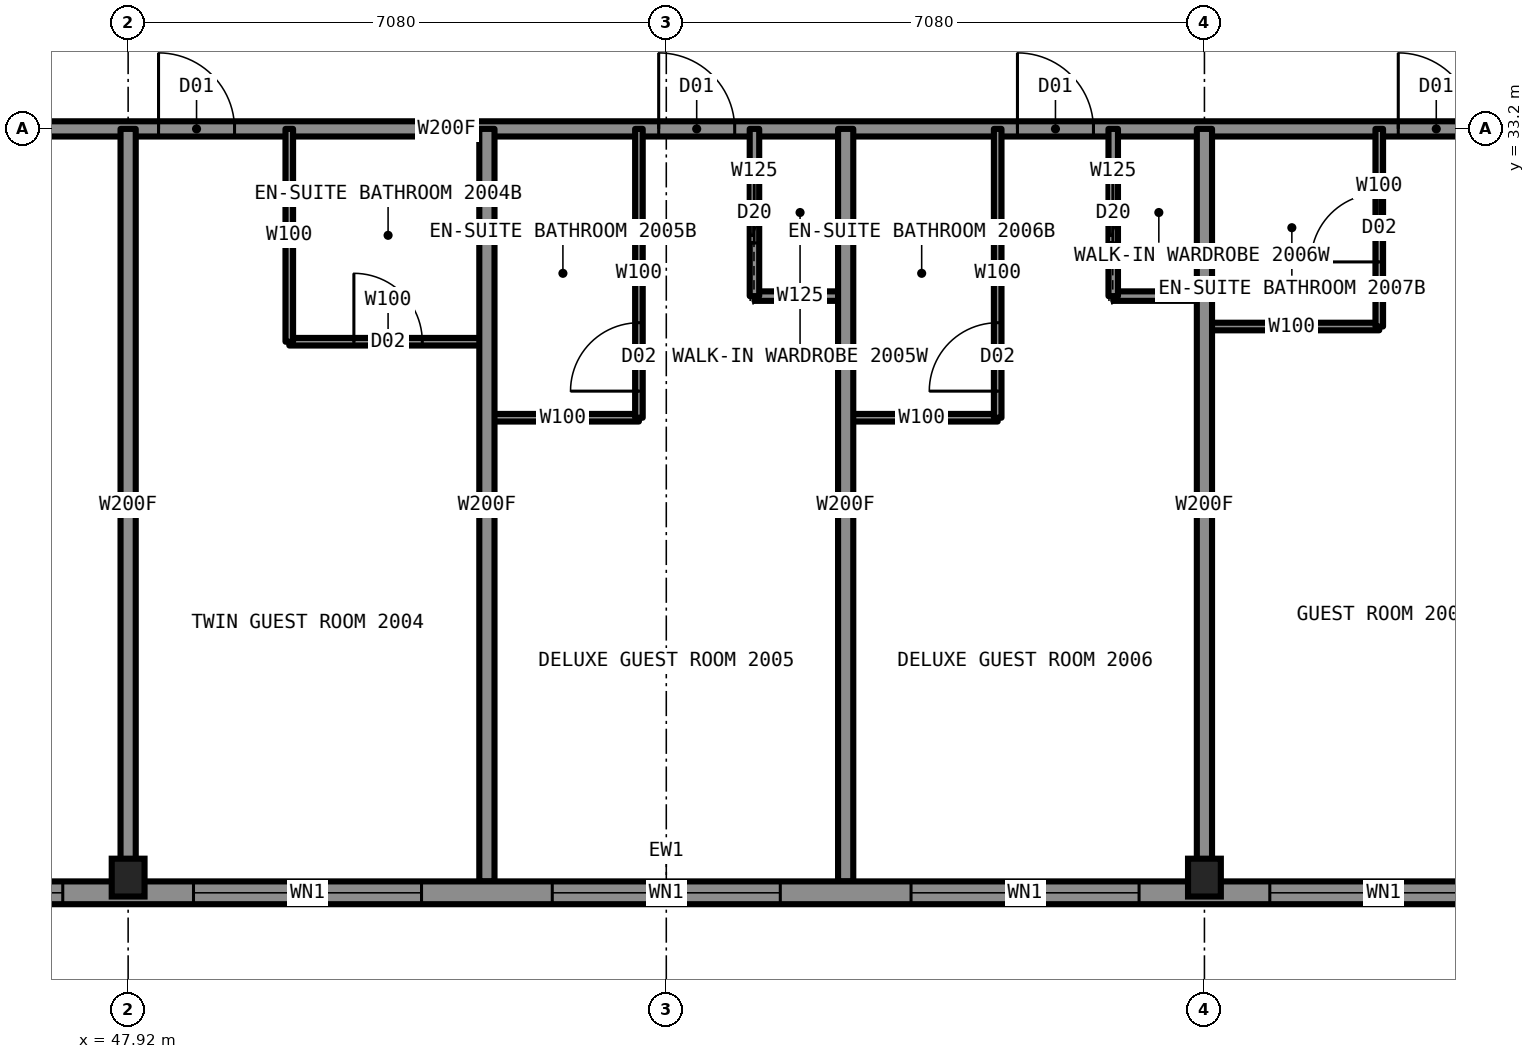
"""IFC4 building model, lengths in metres.
Left out: names, types, materials, properties, quantities, classifications, styles, units other than length and angle.
Written with IfcOpenShell. Run it as: python <this file> out.ifc"""

import sys

from ifc_helpers import new_model, si_unit, direction, frame, frame_2d, origin, origin_2d, place, context, subcontext, project, spatial, rectangle, i_section, extrude, element, fill, save


model = new_model("IFC4")
c1 = context("Model", 3, precision=1e-05, world=origin(), true_north=direction((0.0, 1.0)))
c2 = subcontext(c1, "Body", "Model", "MODEL_VIEW")
j1 = project(units=[si_unit("LENGTHUNIT", "METRE"), si_unit("PLANEANGLEUNIT", "RADIAN")], contexts=[c1])
p1 = place(None, origin())
s1 = spatial("IfcSite", under=j1, at=p1, CompositionType="ELEMENT")
p2 = place(p1, origin())
s2 = spatial("IfcBuilding", under=s1, at=p2, CompositionType="ELEMENT")
p3 = place(p2, frame((0.0, 0.0, 70.5)))
s3 = spatial("IfcBuildingStorey", under=s2, at=p3, CompositionType="ELEMENT", Elevation=70.5)
for number, where, z_axis, x_axis in (
    (1, (47.92, 23.35, 0.0), (0.0, 0.0, 1.0), (1.0, 0.0, 0.0)),
    (2, (62.08, 23.35, 0.0), (0.0, 0.0, 1.0), (1.0, 0.0, 0.0)),
):
    element("IfcColumn", number, at=place(p3, frame(where, z_axis=z_axis, x_axis=x_axis)), inside=s3, PredefinedType="COLUMN", context=c2, shape_type="SweptSolid", body=[
        extrude(i_section(OverallWidth=0.432, OverallDepth=0.498, WebThickness=0.056, FlangeThickness=0.089, at=origin_2d()), origin(), (0.0, 0.0, 1.0), 3.5),
    ])
p4 = place(p3, frame((43.2, 33.2, 0.0), z_axis=(0.0, 0.0, 1.0), x_axis=(1.0, 0.0, 0.0)))
e3 = element("IfcWall", 3, at=p4, inside=s3, PredefinedType="PARTITIONING", context=c2, shape_type="SweptSolid", body=[
    extrude(rectangle(XDim=23.6, YDim=0.2, at=frame_2d((11.8, 0.0))), origin(), (0.0, 0.0, 1.0), 3.33),
])
p5 = place(p4, frame((2.55, 0.0, 0.0)))
e4 = element("IfcOpeningElement", 4, at=p5, cuts=e3, PredefinedType="OPENING", context=c2, shape_type="SweptSolid", body=[
    extrude(rectangle(XDim=1.0, YDim=2.2, at=frame_2d((0.5, 1.1))), frame((0.0, 0.11, 0.0), z_axis=(0.0, -1.0, 0.0), x_axis=(1.0, 0.0, 0.0)), (0.0, 0.0, 1.0), 0.22),
])
p6 = place(p4, frame((5.12, 0.0, 0.0)))
e5 = element("IfcOpeningElement", 5, at=p6, cuts=e3, PredefinedType="OPENING", context=c2, shape_type="SweptSolid", body=[
    extrude(rectangle(XDim=1.0, YDim=2.2, at=frame_2d((0.5, 1.1))), frame((0.0, 0.11, 0.0), z_axis=(0.0, -1.0, 0.0), x_axis=(1.0, 0.0, 0.0)), (0.0, 0.0, 1.0), 0.22),
])
p7 = place(p4, frame((11.7, 0.0, 0.0)))
e6 = element("IfcOpeningElement", 6, at=p7, cuts=e3, PredefinedType="OPENING", context=c2, shape_type="SweptSolid", body=[
    extrude(rectangle(XDim=1.0, YDim=2.2, at=frame_2d((0.5, 1.1))), frame((0.0, 0.11, 0.0), z_axis=(0.0, -1.0, 0.0), x_axis=(1.0, 0.0, 0.0)), (0.0, 0.0, 1.0), 0.22),
])
p8 = place(p4, frame((16.42, 0.0, 0.0)))
e7 = element("IfcOpeningElement", 7, at=p8, cuts=e3, PredefinedType="OPENING", context=c2, shape_type="SweptSolid", body=[
    extrude(rectangle(XDim=1.0, YDim=2.2, at=frame_2d((0.5, 1.1))), frame((0.0, 0.11, 0.0), z_axis=(0.0, -1.0, 0.0), x_axis=(1.0, 0.0, 0.0)), (0.0, 0.0, 1.0), 0.22),
])
p9 = place(p4, frame((21.43, 0.0, 0.0)))
e8 = element("IfcOpeningElement", 8, at=p9, cuts=e3, PredefinedType="OPENING", context=c2, shape_type="SweptSolid", body=[
    extrude(rectangle(XDim=1.0, YDim=2.2, at=frame_2d((0.5, 1.1))), frame((0.0, 0.11, 0.0), z_axis=(0.0, -1.0, 0.0), x_axis=(1.0, 0.0, 0.0)), (0.0, 0.0, 1.0), 0.22),
])
for number, where, z_axis, x_axis in (
    (9, (56.16, 31.0, 0.0), (0.0, 0.0, 1.0), (1.0, 0.0, 0.0)),
    (10, (60.88, 31.0, 0.0), (0.0, 0.0, 1.0), (1.0, 0.0, 0.0)),
):
    element("IfcWall", number, at=place(p3, frame(where, z_axis=z_axis, x_axis=x_axis)), inside=s3, PredefinedType="PARTITIONING", context=c2, shape_type="SweptSolid", body=[
        extrude(rectangle(XDim=1.2, YDim=0.125, at=frame_2d((0.6, 0.0))), origin(), (0.0, 0.0, 1.0), 3.33),
    ])
p10 = place(p3, frame((62.08, 30.6, 0.0), z_axis=(0.0, 0.0, 1.0), x_axis=(1.0, 0.0, 0.0)))
e11 = element("IfcWall", 11, at=p10, inside=s3, PredefinedType="PARTITIONING", context=c2, shape_type="SweptSolid", body=[
    extrude(rectangle(XDim=2.3, YDim=0.1, at=frame_2d((1.15, 0.0))), origin(), (0.0, 0.0, 1.0), 3.33),
])
p11 = place(p3, frame((50.04, 30.4, 0.0), z_axis=(0.0, 0.0, 1.0), x_axis=(1.0, 0.0, 0.0)))
e12 = element("IfcWall", 12, at=p11, inside=s3, PredefinedType="PARTITIONING", context=c2, shape_type="SweptSolid", body=[
    extrude(rectangle(XDim=2.6, YDim=0.1, at=frame_2d((1.3, 0.0))), origin(), (0.0, 0.0, 1.0), 3.33),
])
p12 = place(p11, frame((0.85, 0.0, 0.0)))
e13 = element("IfcOpeningElement", 13, at=p12, cuts=e12, PredefinedType="OPENING", context=c2, shape_type="SweptSolid", body=[
    extrude(rectangle(XDim=0.9, YDim=2.1, at=frame_2d((0.45, 1.05))), frame((0.0, 0.06, 0.0), z_axis=(0.0, -1.0, 0.0), x_axis=(1.0, 0.0, 0.0)), (0.0, 0.0, 1.0), 0.12),
])
for number, where, z_axis, x_axis in (
    (14, (52.64, 29.4, 0.0), (0.0, 0.0, 1.0), (1.0, 0.0, 0.0)),
    (15, (57.36, 29.4, 0.0), (0.0, 0.0, 1.0), (1.0, 0.0, 0.0)),
):
    element("IfcWall", number, at=place(p3, frame(where, z_axis=z_axis, x_axis=x_axis)), inside=s3, PredefinedType="PARTITIONING", context=c2, shape_type="SweptSolid", body=[
        extrude(rectangle(XDim=2.0, YDim=0.1, at=frame_2d((1.0, 0.0))), origin(), (0.0, 0.0, 1.0), 3.33),
    ])
p13 = place(p3, frame((54.64, 29.4, 0.0), z_axis=(0.0, 0.0, 1.0), x_axis=(0.0, 1.0, 0.0)))
e16 = element("IfcWall", 16, at=p13, inside=s3, PredefinedType="PARTITIONING", context=c2, shape_type="SweptSolid", body=[
    extrude(rectangle(XDim=3.8, YDim=0.1, at=frame_2d((1.9, 0.0))), origin(), (0.0, 0.0, 1.0), 3.33),
])
p14 = place(p13, frame((0.35, 0.0, 0.0)))
e17 = element("IfcOpeningElement", 17, at=p14, cuts=e16, PredefinedType="OPENING", context=c2, shape_type="SweptSolid", body=[
    extrude(rectangle(XDim=0.9, YDim=2.1, at=frame_2d((0.45, 1.05))), frame((0.0, 0.06, 0.0), z_axis=(0.0, -1.0, 0.0), x_axis=(1.0, 0.0, 0.0)), (0.0, 0.0, 1.0), 0.12),
])
p15 = place(p3, frame((52.64, 23.3, 0.0), z_axis=(0.0, 0.0, 1.0), x_axis=(0.0, 1.0, 0.0)))
e18 = element("IfcWall", 18, at=p15, inside=s3, PredefinedType="PARTITIONING", context=c2, shape_type="SweptSolid", body=[
    extrude(rectangle(XDim=9.9, YDim=0.2, at=frame_2d((4.95, 0.0))), origin(), (0.0, 0.0, 1.0), 3.33),
])
p16 = place(p3, frame((50.04, 30.4, 0.0), z_axis=(0.0, 0.0, 1.0), x_axis=(0.0, 1.0, 0.0)))
e19 = element("IfcWall", 19, at=p16, inside=s3, PredefinedType="PARTITIONING", context=c2, shape_type="SweptSolid", body=[
    extrude(rectangle(XDim=2.8, YDim=0.1, at=frame_2d((1.4, 0.0))), origin(), (0.0, 0.0, 1.0), 3.33),
])
p17 = place(p3, frame((47.92, 23.3, 0.0), z_axis=(0.0, 0.0, 1.0), x_axis=(0.0, 1.0, 0.0)))
e20 = element("IfcWall", 20, at=p17, inside=s3, PredefinedType="PARTITIONING", context=c2, shape_type="SweptSolid", body=[
    extrude(rectangle(XDim=9.9, YDim=0.2, at=frame_2d((4.95, 0.0))), origin(), (0.0, 0.0, 1.0), 2.573),
])
p18 = place(p3, frame((56.16, 31.0, 0.0), z_axis=(0.0, 0.0, 1.0), x_axis=(0.0, 1.0, 0.0)))
e21 = element("IfcWall", 21, at=p18, inside=s3, PredefinedType="PARTITIONING", context=c2, shape_type="SweptSolid", body=[
    extrude(rectangle(XDim=2.2, YDim=0.125, at=frame_2d((1.1, 0.0))), origin(), (0.0, 0.0, 1.0), 3.33),
])
p19 = place(p18, frame((0.7, 0.0, 0.0)))
e22 = element("IfcOpeningElement", 22, at=p19, cuts=e21, PredefinedType="OPENING", context=c2, shape_type="SweptSolid", body=[
    extrude(rectangle(XDim=0.8, YDim=2.1, at=frame_2d((0.4, 1.05))), frame((0.0, 0.073, 0.0), z_axis=(0.0, -1.0, 0.0), x_axis=(1.0, 0.0, 0.0)), (0.0, 0.0, 1.0), 0.145),
])
p20 = place(p3, frame((57.36, 23.3, 0.0), z_axis=(0.0, 0.0, 1.0), x_axis=(0.0, 1.0, 0.0)))
e23 = element("IfcWall", 23, at=p20, inside=s3, PredefinedType="PARTITIONING", context=c2, shape_type="SweptSolid", body=[
    extrude(rectangle(XDim=9.9, YDim=0.2, at=frame_2d((4.95, 0.0))), origin(), (0.0, 0.0, 1.0), 3.33),
])
p21 = place(p3, frame((59.36, 29.4, 0.0), z_axis=(0.0, 0.0, 1.0), x_axis=(0.0, 1.0, 0.0)))
e24 = element("IfcWall", 24, at=p21, inside=s3, PredefinedType="PARTITIONING", context=c2, shape_type="SweptSolid", body=[
    extrude(rectangle(XDim=3.8, YDim=0.1, at=frame_2d((1.9, 0.0))), origin(), (0.0, 0.0, 1.0), 3.33),
])
p22 = place(p21, frame((0.35, 0.0, 0.0)))
e25 = element("IfcOpeningElement", 25, at=p22, cuts=e24, PredefinedType="OPENING", context=c2, shape_type="SweptSolid", body=[
    extrude(rectangle(XDim=0.9, YDim=2.1, at=frame_2d((0.45, 1.05))), frame((0.0, 0.06, 0.0), z_axis=(0.0, -1.0, 0.0), x_axis=(1.0, 0.0, 0.0)), (0.0, 0.0, 1.0), 0.12),
])
p23 = place(p3, frame((60.88, 31.0, 0.0), z_axis=(0.0, 0.0, 1.0), x_axis=(0.0, 1.0, 0.0)))
e26 = element("IfcWall", 26, at=p23, inside=s3, PredefinedType="PARTITIONING", context=c2, shape_type="SweptSolid", body=[
    extrude(rectangle(XDim=2.2, YDim=0.125, at=frame_2d((1.1, 0.0))), origin(), (0.0, 0.0, 1.0), 3.33),
])
p24 = place(p23, frame((0.7, 0.0, 0.0)))
e27 = element("IfcOpeningElement", 27, at=p24, cuts=e26, PredefinedType="OPENING", context=c2, shape_type="SweptSolid", body=[
    extrude(rectangle(XDim=0.8, YDim=2.1, at=frame_2d((0.4, 1.05))), frame((0.0, 0.073, 0.0), z_axis=(0.0, -1.0, 0.0), x_axis=(1.0, 0.0, 0.0)), (0.0, 0.0, 1.0), 0.145),
])
p25 = place(p3, frame((62.08, 23.3, 0.0), z_axis=(0.0, 0.0, 1.0), x_axis=(0.0, 1.0, 0.0)))
e28 = element("IfcWall", 28, at=p25, inside=s3, PredefinedType="PARTITIONING", context=c2, shape_type="SweptSolid", body=[
    extrude(rectangle(XDim=9.9, YDim=0.2, at=frame_2d((4.95, 0.0))), origin(), (0.0, 0.0, 1.0), 2.573),
])
p26 = place(p3, frame((64.38, 30.6, 0.0), z_axis=(0.0, 0.0, 1.0), x_axis=(0.0, 1.0, 0.0)))
e29 = element("IfcWall", 29, at=p26, inside=s3, PredefinedType="PARTITIONING", context=c2, shape_type="SweptSolid", body=[
    extrude(rectangle(XDim=2.6, YDim=0.1, at=frame_2d((1.3, 0.0))), origin(), (0.0, 0.0, 1.0), 3.33),
])
p27 = place(p26, frame((0.85, 0.0, 0.0)))
e30 = element("IfcOpeningElement", 30, at=p27, cuts=e29, PredefinedType="OPENING", context=c2, shape_type="SweptSolid", body=[
    extrude(rectangle(XDim=0.9, YDim=2.1, at=frame_2d((0.45, 1.05))), frame((0.0, 0.06, 0.0), z_axis=(0.0, -1.0, 0.0), x_axis=(1.0, 0.0, 0.0)), (0.0, 0.0, 1.0), 0.12),
])
p28 = place(p3, frame((38.5, 23.15, 0.0), z_axis=(0.0, 0.0, 1.0), x_axis=(1.0, 0.0, 0.0)))
e31 = element("IfcWall", 31, at=p28, inside=s3, PredefinedType="SOLIDWALL", context=c2, shape_type="SweptSolid", body=[
    extrude(rectangle(XDim=33.0, YDim=0.3, at=frame_2d((16.5, 0.0))), origin(), (0.0, 0.0, 1.0), 2.83),
])
p29 = place(p28, frame((0.85, 0.0, 0.5)))
e32 = element("IfcOpeningElement", 32, at=p29, cuts=e31, PredefinedType="OPENING", context=c2, shape_type="SweptSolid", body=[
    extrude(rectangle(XDim=2.9, YDim=2.0, at=frame_2d((1.45, 1.0))), frame((0.0, 0.16, 0.0), z_axis=(0.0, -1.0, 0.0), x_axis=(1.0, 0.0, 0.0)), (0.0, 0.0, 1.0), 0.32),
])
p30 = place(p28, frame((6.96, 0.0, 0.55)))
e33 = element("IfcOpeningElement", 33, at=p30, cuts=e31, PredefinedType="OPENING", context=c2, shape_type="SweptSolid", body=[
    extrude(rectangle(XDim=1.6, YDim=1.9, at=frame_2d((0.8, 0.95))), frame((0.0, 0.16, 0.0), z_axis=(0.0, -1.0, 0.0), x_axis=(1.0, 0.0, 0.0)), (0.0, 0.0, 1.0), 0.32),
])
p31 = place(p28, frame((10.28, 0.0, 0.5)))
e34 = element("IfcOpeningElement", 34, at=p31, cuts=e31, PredefinedType="OPENING", context=c2, shape_type="SweptSolid", body=[
    extrude(rectangle(XDim=3.0, YDim=2.0, at=frame_2d((1.5, 1.0))), frame((0.0, 0.16, 0.0), z_axis=(0.0, -1.0, 0.0), x_axis=(1.0, 0.0, 0.0)), (0.0, 0.0, 1.0), 0.32),
])
p32 = place(p28, frame((15.0, 0.0, 0.5)))
e35 = element("IfcOpeningElement", 35, at=p32, cuts=e31, PredefinedType="OPENING", context=c2, shape_type="SweptSolid", body=[
    extrude(rectangle(XDim=3.0, YDim=2.0, at=frame_2d((1.5, 1.0))), frame((0.0, 0.16, 0.0), z_axis=(0.0, -1.0, 0.0), x_axis=(1.0, 0.0, 0.0)), (0.0, 0.0, 1.0), 0.32),
])
p33 = place(p28, frame((19.72, 0.0, 0.5)))
e36 = element("IfcOpeningElement", 36, at=p33, cuts=e31, PredefinedType="OPENING", context=c2, shape_type="SweptSolid", body=[
    extrude(rectangle(XDim=3.0, YDim=2.0, at=frame_2d((1.5, 1.0))), frame((0.0, 0.16, 0.0), z_axis=(0.0, -1.0, 0.0), x_axis=(1.0, 0.0, 0.0)), (0.0, 0.0, 1.0), 0.32),
])
p34 = place(p28, frame((24.44, 0.0, 0.55)))
e37 = element("IfcOpeningElement", 37, at=p34, cuts=e31, PredefinedType="OPENING", context=c2, shape_type="SweptSolid", body=[
    extrude(rectangle(XDim=1.6, YDim=1.9, at=frame_2d((0.8, 0.95))), frame((0.0, 0.16, 0.0), z_axis=(0.0, -1.0, 0.0), x_axis=(1.0, 0.0, 0.0)), (0.0, 0.0, 1.0), 0.32),
])
p35 = place(p28, frame((29.25, 0.0, 0.5)))
e38 = element("IfcOpeningElement", 38, at=p35, cuts=e31, PredefinedType="OPENING", context=c2, shape_type="SweptSolid", body=[
    extrude(rectangle(XDim=2.9, YDim=2.0, at=frame_2d((1.45, 1.0))), frame((0.0, 0.16, 0.0), z_axis=(0.0, -1.0, 0.0), x_axis=(1.0, 0.0, 0.0)), (0.0, 0.0, 1.0), 0.32),
])
p36 = place(p28, frame((6.31, 0.0, 1.45)))
e39 = element("IfcOpeningElement", 39, at=p36, cuts=e31, PredefinedType="OPENING", context=c2, shape_type="SweptSolid", body=[
    extrude(rectangle(XDim=0.6, YDim=1.0, at=frame_2d((0.3, 0.5))), frame((0.0, 0.16, 0.0), z_axis=(0.0, -1.0, 0.0), x_axis=(1.0, 0.0, 0.0)), (0.0, 0.0, 1.0), 0.32),
])
p37 = place(p28, frame((26.04, 0.0, 1.45)))
e40 = element("IfcOpeningElement", 40, at=p37, cuts=e31, PredefinedType="OPENING", context=c2, shape_type="SweptSolid", body=[
    extrude(rectangle(XDim=0.6, YDim=1.0, at=frame_2d((0.3, 0.5))), frame((0.0, 0.16, 0.0), z_axis=(0.0, -1.0, 0.0), x_axis=(1.0, 0.0, 0.0)), (0.0, 0.0, 1.0), 0.32),
])
p38 = place(p6, origin())
e41 = element("IfcDoor", 41, at=p38, inside=s3, OperationType="SINGLE_SWING_LEFT", PredefinedType="DOOR", context=c2, shape_type="SweptSolid", body=[
    extrude(rectangle(XDim=1.0, YDim=2.2, at=frame_2d((0.5, 1.1))), frame((0.0, 0.025, 0.0), z_axis=(0.0, -1.0, 0.0), x_axis=(1.0, 0.0, 0.0)), (0.0, 0.0, 1.0), 0.05),
])
fill(e5, e41)
p39 = place(p12, origin())
e42 = element("IfcDoor", 42, at=p39, inside=s3, OperationType="SINGLE_SWING_RIGHT", PredefinedType="DOOR", context=c2, shape_type="SweptSolid", body=[
    extrude(rectangle(XDim=0.9, YDim=2.1, at=frame_2d((0.45, 1.05))), frame((0.0, 0.025, 0.0), z_axis=(0.0, -1.0, 0.0), x_axis=(1.0, 0.0, 0.0)), (0.0, 0.0, 1.0), 0.05),
])
fill(e13, e42)
p40 = place(p7, origin())
e43 = element("IfcDoor", 43, at=p40, inside=s3, OperationType="SINGLE_SWING_LEFT", PredefinedType="DOOR", context=c2, shape_type="SweptSolid", body=[
    extrude(rectangle(XDim=1.0, YDim=2.2, at=frame_2d((0.5, 1.1))), frame((0.0, 0.025, 0.0), z_axis=(0.0, -1.0, 0.0), x_axis=(1.0, 0.0, 0.0)), (0.0, 0.0, 1.0), 0.05),
])
fill(e6, e43)
p41 = place(p14, origin())
e44 = element("IfcDoor", 44, at=p41, inside=s3, OperationType="SINGLE_SWING_RIGHT", PredefinedType="DOOR", context=c2, shape_type="SweptSolid", body=[
    extrude(rectangle(XDim=0.9, YDim=2.1, at=frame_2d((0.45, 1.05))), frame((0.0, 0.025, 0.0), z_axis=(0.0, -1.0, 0.0), x_axis=(1.0, 0.0, 0.0)), (0.0, 0.0, 1.0), 0.05),
])
fill(e17, e44)
p42 = place(p19, origin())
e45 = element("IfcDoor", 45, at=p42, inside=s3, OperationType="SLIDING_TO_LEFT", PredefinedType="DOOR", context=c2, shape_type="SweptSolid", body=[
    extrude(rectangle(XDim=0.8, YDim=2.1, at=frame_2d((0.4, 1.05))), frame((0.0, 0.025, 0.0), z_axis=(0.0, -1.0, 0.0), x_axis=(1.0, 0.0, 0.0)), (0.0, 0.0, 1.0), 0.05),
])
fill(e22, e45)
p43 = place(p8, origin())
e46 = element("IfcDoor", 46, at=p43, inside=s3, OperationType="SINGLE_SWING_LEFT", PredefinedType="DOOR", context=c2, shape_type="SweptSolid", body=[
    extrude(rectangle(XDim=1.0, YDim=2.2, at=frame_2d((0.5, 1.1))), frame((0.0, 0.025, 0.0), z_axis=(0.0, -1.0, 0.0), x_axis=(1.0, 0.0, 0.0)), (0.0, 0.0, 1.0), 0.05),
])
fill(e7, e46)
p44 = place(p22, origin())
e47 = element("IfcDoor", 47, at=p44, inside=s3, OperationType="SINGLE_SWING_RIGHT", PredefinedType="DOOR", context=c2, shape_type="SweptSolid", body=[
    extrude(rectangle(XDim=0.9, YDim=2.1, at=frame_2d((0.45, 1.05))), frame((0.0, 0.025, 0.0), z_axis=(0.0, -1.0, 0.0), x_axis=(1.0, 0.0, 0.0)), (0.0, 0.0, 1.0), 0.05),
])
fill(e25, e47)
p45 = place(p24, origin())
e48 = element("IfcDoor", 48, at=p45, inside=s3, OperationType="SLIDING_TO_LEFT", PredefinedType="DOOR", context=c2, shape_type="SweptSolid", body=[
    extrude(rectangle(XDim=0.8, YDim=2.1, at=frame_2d((0.4, 1.05))), frame((0.0, 0.025, 0.0), z_axis=(0.0, -1.0, 0.0), x_axis=(1.0, 0.0, 0.0)), (0.0, 0.0, 1.0), 0.05),
])
fill(e27, e48)
p46 = place(p9, origin())
e49 = element("IfcDoor", 49, at=p46, inside=s3, OperationType="SINGLE_SWING_LEFT", PredefinedType="DOOR", context=c2, shape_type="SweptSolid", body=[
    extrude(rectangle(XDim=1.0, YDim=2.2, at=frame_2d((0.5, 1.1))), frame((0.0, 0.025, 0.0), z_axis=(0.0, -1.0, 0.0), x_axis=(1.0, 0.0, 0.0)), (0.0, 0.0, 1.0), 0.05),
])
fill(e8, e49)
p47 = place(p27, origin())
e50 = element("IfcDoor", 50, at=p47, inside=s3, OperationType="SINGLE_SWING_RIGHT", PredefinedType="DOOR", context=c2, shape_type="SweptSolid", body=[
    extrude(rectangle(XDim=0.9, YDim=2.1, at=frame_2d((0.45, 1.05))), frame((0.0, 0.025, 0.0), z_axis=(0.0, -1.0, 0.0), x_axis=(1.0, 0.0, 0.0)), (0.0, 0.0, 1.0), 0.05),
])
fill(e30, e50)
p48 = place(p30, origin())
e51 = element("IfcWindow", 51, at=p48, inside=s3, PartitioningType="SINGLE_PANEL", PredefinedType="WINDOW", context=c2, shape_type="SweptSolid", body=[
    extrude(rectangle(XDim=1.6, YDim=1.9, at=frame_2d((0.8, 0.95))), frame((0.0, 0.03, 0.0), z_axis=(0.0, -1.0, 0.0), x_axis=(1.0, 0.0, 0.0)), (0.0, 0.0, 1.0), 0.06),
])
fill(e33, e51)
p49 = place(p31, origin())
e52 = element("IfcWindow", 52, at=p49, inside=s3, PartitioningType="SINGLE_PANEL", PredefinedType="WINDOW", context=c2, shape_type="SweptSolid", body=[
    extrude(rectangle(XDim=3.0, YDim=2.0, at=frame_2d((1.5, 1.0))), frame((0.0, 0.03, 0.0), z_axis=(0.0, -1.0, 0.0), x_axis=(1.0, 0.0, 0.0)), (0.0, 0.0, 1.0), 0.06),
])
fill(e34, e52)
p50 = place(p32, origin())
e53 = element("IfcWindow", 53, at=p50, inside=s3, PartitioningType="SINGLE_PANEL", PredefinedType="WINDOW", context=c2, shape_type="SweptSolid", body=[
    extrude(rectangle(XDim=3.0, YDim=2.0, at=frame_2d((1.5, 1.0))), frame((0.0, 0.03, 0.0), z_axis=(0.0, -1.0, 0.0), x_axis=(1.0, 0.0, 0.0)), (0.0, 0.0, 1.0), 0.06),
])
fill(e35, e53)
p51 = place(p33, origin())
e54 = element("IfcWindow", 54, at=p51, inside=s3, PartitioningType="SINGLE_PANEL", PredefinedType="WINDOW", context=c2, shape_type="SweptSolid", body=[
    extrude(rectangle(XDim=3.0, YDim=2.0, at=frame_2d((1.5, 1.0))), frame((0.0, 0.03, 0.0), z_axis=(0.0, -1.0, 0.0), x_axis=(1.0, 0.0, 0.0)), (0.0, 0.0, 1.0), 0.06),
])
fill(e36, e54)
p52 = place(p34, origin())
e55 = element("IfcWindow", 55, at=p52, inside=s3, PartitioningType="SINGLE_PANEL", PredefinedType="WINDOW", context=c2, shape_type="SweptSolid", body=[
    extrude(rectangle(XDim=1.6, YDim=1.9, at=frame_2d((0.8, 0.95))), frame((0.0, 0.03, 0.0), z_axis=(0.0, -1.0, 0.0), x_axis=(1.0, 0.0, 0.0)), (0.0, 0.0, 1.0), 0.06),
])
fill(e37, e55)
p53 = place(p37, origin())
e56 = element("IfcWindow", 56, at=p53, inside=s3, PartitioningType="SINGLE_PANEL", PredefinedType="WINDOW", context=c2, shape_type="SweptSolid", body=[
    extrude(rectangle(XDim=0.6, YDim=1.0, at=frame_2d((0.3, 0.5))), frame((0.0, 0.03, 0.0), z_axis=(0.0, -1.0, 0.0), x_axis=(1.0, 0.0, 0.0)), (0.0, 0.0, 1.0), 0.06),
])
fill(e40, e56)
save(model, sys.argv[1])
